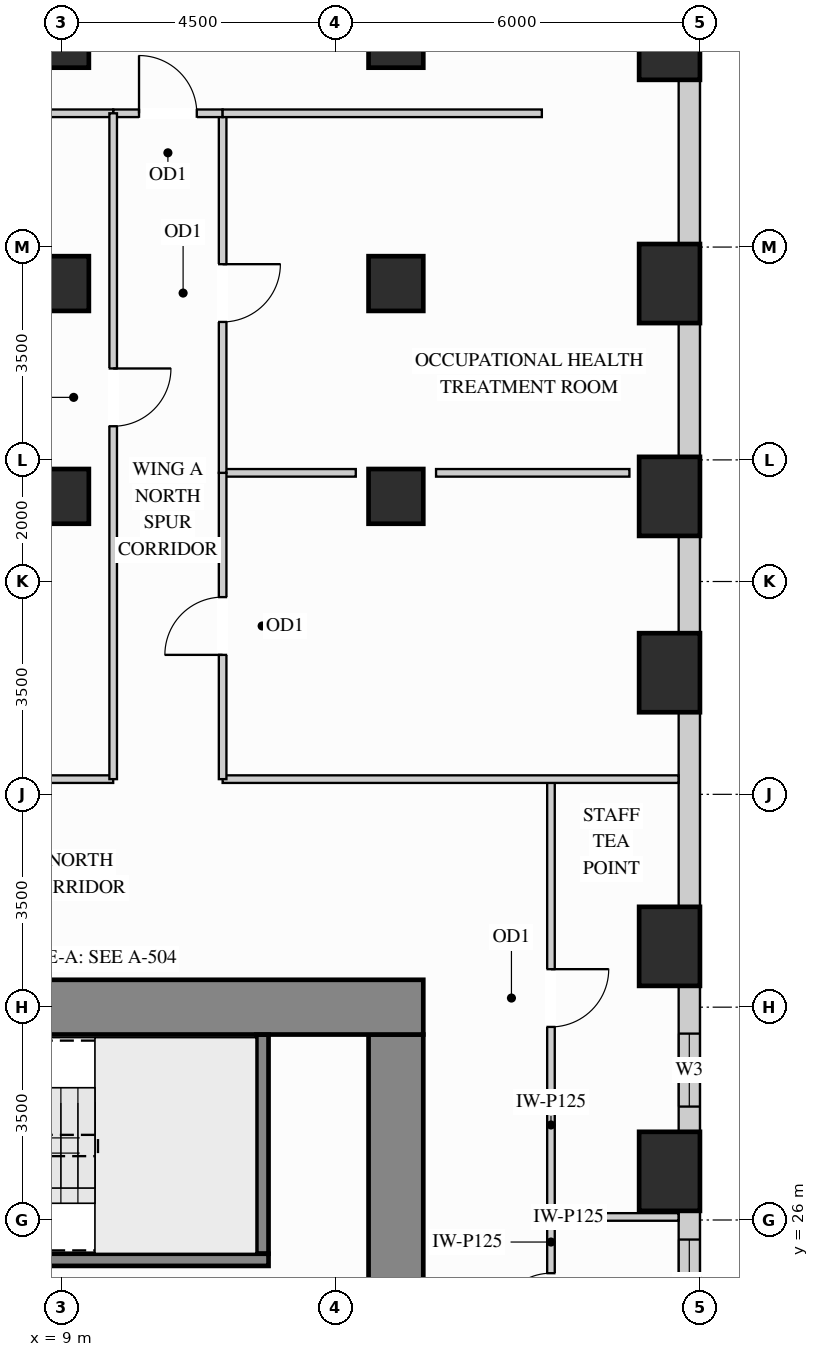
"""IFC4 building model, lengths in metres.
Left out: names, types, materials, properties, quantities, classifications, styles, units other than length and angle.
Written with IfcOpenShell. Run it as: python <this file> out.ifc"""

import sys

from ifc_helpers import new_model, si_unit, direction, frame, frame_2d, origin, origin_2d, place, context, subcontext, project, spatial, rectangle, extrude, source, transform, mapped, element, fill, save


model = new_model("IFC4")
c1 = context("Model", 3, precision=1e-05, world=origin(), true_north=direction((0.0, 1.0)))
c2 = subcontext(c1, "Body", "Model", "MODEL_VIEW")
j1 = project(units=[si_unit("LENGTHUNIT", "METRE"), si_unit("PLANEANGLEUNIT", "RADIAN")], contexts=[c1])
p1 = place(None, origin())
s1 = spatial("IfcSite", under=j1, at=p1, CompositionType="ELEMENT")
p2 = place(p1, origin())
s2 = spatial("IfcBuilding", under=s1, at=p2, CompositionType="ELEMENT")
p3 = place(p2, frame((0.0, 0.0, 33.3)))
s3 = spatial("IfcBuildingStorey", under=s2, at=p3, CompositionType="ELEMENT", Elevation=33.3)
m1 = source(origin(), c2, "Body", "SweptSolid", [
    extrude(rectangle(XDim=0.9, YDim=0.9, at=origin_2d()), origin(), (0.0, 0.0, 1.0), 3.38),
])
for number, where, z_axis, x_axis in (
    (1, (14.5, 37.9, 0.0), (0.0, 0.0, 1.0), (1.0, 0.0, 0.0)),
    (2, (14.5, 41.4, 0.0), (0.0, 0.0, 1.0), (1.0, 0.0, 0.0)),
    (3, (14.5, 45.4, 0.0), (0.0, 0.0, 1.0), (1.0, 0.0, 0.0)),
    (4, (9.0, 37.9, 0.0), (0.0, 0.0, 1.0), (1.0, 0.0, 0.0)),
    (5, (9.0, 41.4, 0.0), (0.0, 0.0, 1.0), (1.0, 0.0, 0.0)),
    (6, (9.0, 45.4, 0.0), (0.0, 0.0, 1.0), (1.0, 0.0, 0.0)),
):
    element("IfcColumn", number, at=place(p3, frame(where, z_axis=z_axis, x_axis=x_axis)), inside=s3, PredefinedType="COLUMN", context=c2, shape_type="MappedRepresentation", body=[
        mapped(m1, transform((0.0, 0.0, 0.0), x_axis=(1.0, 0.0, 0.0), y_axis=(0.0, 1.0, 0.0), z_axis=(0.0, 0.0, 1.0))),
    ])
m2 = source(origin(), c2, "Body", "SweptSolid", [
    extrude(rectangle(XDim=1.0, YDim=1.3, at=origin_2d()), origin(), (0.0, 0.0, 1.0), 3.38),
])
for number, where, z_axis, x_axis in (
    (7, (19.0, 26.8, 0.0), (0.0, 0.0, 1.0), (1.0, 0.0, 0.0)),
    (8, (19.0, 30.5, 0.0), (0.0, 0.0, 1.0), (1.0, 0.0, 0.0)),
    (9, (19.0, 35.0, 0.0), (0.0, 0.0, 1.0), (1.0, 0.0, 0.0)),
    (10, (19.0, 37.9, 0.0), (0.0, 0.0, 1.0), (1.0, 0.0, 0.0)),
    (11, (19.0, 41.4, 0.0), (0.0, 0.0, 1.0), (1.0, 0.0, 0.0)),
    (12, (19.0, 45.4, 0.0), (0.0, 0.0, 1.0), (1.0, 0.0, 0.0)),
):
    element("IfcColumn", number, at=place(p3, frame(where, z_axis=z_axis, x_axis=x_axis)), inside=s3, PredefinedType="COLUMN", context=c2, shape_type="MappedRepresentation", body=[
        mapped(m2, transform((0.0, 0.0, 0.0), x_axis=(1.0, 0.0, 0.0), y_axis=(0.0, 1.0, 0.0), z_axis=(0.0, 0.0, 1.0))),
    ])
m3 = source(origin(), c2, "Body", "SweptSolid", [
    extrude(rectangle(XDim=8.17, YDim=0.9, at=frame_2d((4.085, 0.0))), origin(), (0.0, 0.0, 1.0), 3.38),
])
p4 = place(p3, frame((14.5, 20.88, 0.0), z_axis=(0.0, 0.0, 1.0), x_axis=(0.0, 1.0, 0.0)))
e13 = element("IfcWall", 13, at=p4, inside=s3, PredefinedType="SHEAR", context=c2, shape_type="MappedRepresentation", body=[
    mapped(m3, transform((0.0, 0.0, 0.0), x_axis=(1.0, 0.0, 0.0), y_axis=(0.0, 1.0, 0.0), z_axis=(0.0, 0.0, 1.0))),
])
m4 = source(origin(), c2, "Body", "SweptSolid", [
    extrude(rectangle(XDim=10.9, YDim=0.9, at=frame_2d((5.45, 0.0))), origin(), (0.0, 0.0, 1.0), 3.38),
])
p5 = place(p3, frame((4.05, 29.5, 0.0), z_axis=(0.0, 0.0, 1.0), x_axis=(1.0, 0.0, 0.0)))
e14 = element("IfcWall", 14, at=p5, inside=s3, PredefinedType="SHEAR", context=c2, shape_type="MappedRepresentation", body=[
    mapped(m4, transform((0.0, 0.0, 0.0), x_axis=(1.0, 0.0, 0.0), y_axis=(0.0, 1.0, 0.0), z_axis=(0.0, 0.0, 1.0))),
])
p6 = place(p3, frame((19.325, 23.148, 0.0), z_axis=(0.0, 0.0, 1.0), x_axis=(0.0, 1.0, 0.0)))
e15 = element("IfcWall", 15, at=p6, inside=s3, PredefinedType="SOLIDWALL", context=c2, shape_type="SweptSolid", body=[
    extrude(rectangle(XDim=3.004, YDim=0.35, at=frame_2d((1.502, 0.0))), origin(), (0.0, 0.0, 1.0), 2.51),
])
p7 = place(p6, frame((1.031, 0.0, 0.78)))
e16 = element("IfcOpeningElement", 16, at=p7, cuts=e15, PredefinedType="OPENING", context=c2, shape_type="SweptSolid", body=[
    extrude(rectangle(XDim=1.5, YDim=1.55, at=frame_2d((0.75, 0.775))), frame((0.0, 0.185, 0.0), z_axis=(0.0, -1.0, 0.0), x_axis=(1.0, 0.0, 0.0)), (0.0, 0.0, 1.0), 0.37),
])
p8 = place(p3, frame((19.325, 27.448, 0.0), z_axis=(0.0, 0.0, 1.0), x_axis=(0.0, 1.0, 0.0)))
e17 = element("IfcWall", 17, at=p8, inside=s3, PredefinedType="SOLIDWALL", context=c2, shape_type="SweptSolid", body=[
    extrude(rectangle(XDim=2.404, YDim=0.35, at=frame_2d((1.202, 0.0))), origin(), (0.0, 0.0, 1.0), 2.51),
])
p9 = place(p8, frame((0.417, 0.0, 0.78)))
e18 = element("IfcOpeningElement", 18, at=p9, cuts=e17, PredefinedType="OPENING", context=c2, shape_type="SweptSolid", body=[
    extrude(rectangle(XDim=1.2, YDim=1.55, at=frame_2d((0.6, 0.775))), frame((0.0, 0.185, 0.0), z_axis=(0.0, -1.0, 0.0), x_axis=(1.0, 0.0, 0.0)), (0.0, 0.0, 1.0), 0.37),
])
m5 = source(origin(), c2, "Body", "SweptSolid", [
    extrude(rectangle(XDim=3.204, YDim=0.35, at=frame_2d((1.602, 0.0))), origin(), (0.0, 0.0, 1.0), 2.51),
])
p10 = place(p3, frame((19.325, 31.148, 0.0), z_axis=(0.0, 0.0, 1.0), x_axis=(0.0, 1.0, 0.0)))
e19 = element("IfcWall", 19, at=p10, inside=s3, PredefinedType="SOLIDWALL", context=c2, shape_type="MappedRepresentation", body=[
    mapped(m5, transform((0.0, 0.0, 0.0), x_axis=(1.0, 0.0, 0.0), y_axis=(0.0, 1.0, 0.0), z_axis=(0.0, 0.0, 1.0))),
])
m6 = source(origin(), c2, "Body", "SweptSolid", [
    extrude(rectangle(XDim=1.604, YDim=0.35, at=frame_2d((0.802, 0.0))), origin(), (0.0, 0.0, 1.0), 2.51),
])
p11 = place(p3, frame((19.325, 35.648, 0.0), z_axis=(0.0, 0.0, 1.0), x_axis=(0.0, 1.0, 0.0)))
e20 = element("IfcWall", 20, at=p11, inside=s3, PredefinedType="SOLIDWALL", context=c2, shape_type="MappedRepresentation", body=[
    mapped(m6, transform((0.0, 0.0, 0.0), x_axis=(1.0, 0.0, 0.0), y_axis=(0.0, 1.0, 0.0), z_axis=(0.0, 0.0, 1.0))),
])
m7 = source(origin(), c2, "Body", "SweptSolid", [
    extrude(rectangle(XDim=2.204, YDim=0.35, at=frame_2d((1.102, 0.0))), origin(), (0.0, 0.0, 1.0), 2.51),
])
p12 = place(p3, frame((19.325, 38.548, 0.0), z_axis=(0.0, 0.0, 1.0), x_axis=(0.0, 1.0, 0.0)))
e21 = element("IfcWall", 21, at=p12, inside=s3, PredefinedType="SOLIDWALL", context=c2, shape_type="MappedRepresentation", body=[
    mapped(m7, transform((0.0, 0.0, 0.0), x_axis=(1.0, 0.0, 0.0), y_axis=(0.0, 1.0, 0.0), z_axis=(0.0, 0.0, 1.0))),
])
m8 = source(origin(), c2, "Body", "SweptSolid", [
    extrude(rectangle(XDim=2.704, YDim=0.35, at=frame_2d((1.352, 0.0))), origin(), (0.0, 0.0, 1.0), 2.51),
])
p13 = place(p3, frame((19.325, 42.048, 0.0), z_axis=(0.0, 0.0, 1.0), x_axis=(0.0, 1.0, 0.0)))
e22 = element("IfcWall", 22, at=p13, inside=s3, PredefinedType="SOLIDWALL", context=c2, shape_type="MappedRepresentation", body=[
    mapped(m8, transform((0.0, 0.0, 0.0), x_axis=(1.0, 0.0, 0.0), y_axis=(0.0, 1.0, 0.0), z_axis=(0.0, 0.0, 1.0))),
])
m9 = source(origin(), c2, "Body", "SweptSolid", [
    extrude(rectangle(XDim=2.098, YDim=0.125, at=frame_2d((1.049, 0.0))), origin(), (0.0, 0.0, 1.0), 3.365),
])
p14 = place(p3, frame((17.05, 26.05, 0.0), z_axis=(0.0, 0.0, 1.0), x_axis=(1.0, 0.0, 0.0)))
e23 = element("IfcWall", 23, at=p14, inside=s3, PredefinedType="PARTITIONING", context=c2, shape_type="MappedRepresentation", body=[
    mapped(m9, transform((0.0, 0.0, 0.0), x_axis=(1.0, 0.0, 0.0), y_axis=(0.0, 1.0, 0.0), z_axis=(0.0, 0.0, 1.0))),
])
p15 = place(p3, frame((17.05, 26.05, 0.0), z_axis=(0.0, 0.0, 1.0), x_axis=(0.0, 1.0, 0.0)))
e24 = element("IfcWall", 24, at=p15, inside=s3, PredefinedType="PARTITIONING", context=c2, shape_type="SweptSolid", body=[
    extrude(rectangle(XDim=7.2, YDim=0.125, at=frame_2d((3.6, 0.0))), origin(), (0.0, 0.0, 1.0), 3.365),
])
p16 = place(p15, frame((3.125, 0.0, 0.0)))
e25 = element("IfcOpeningElement", 25, at=p16, cuts=e24, PredefinedType="OPENING", context=c2, shape_type="SweptSolid", body=[
    extrude(rectangle(XDim=0.95, YDim=2.15, at=frame_2d((0.475, 1.075))), frame((0.0, 0.073, 0.0), z_axis=(0.0, -1.0, 0.0), x_axis=(1.0, 0.0, 0.0)), (0.0, 0.0, 1.0), 0.145),
])
p17 = place(p3, frame((17.05, 23.35, 0.0), z_axis=(0.0, 0.0, 1.0), x_axis=(0.0, 1.0, 0.0)))
e26 = element("IfcWall", 26, at=p17, inside=s3, PredefinedType="PARTITIONING", context=c2, shape_type="SweptSolid", body=[
    extrude(rectangle(XDim=2.7, YDim=0.125, at=frame_2d((1.35, 0.0))), origin(), (0.0, 0.0, 1.0), 3.365),
])
p18 = place(p17, frame((0.875, 0.0, 0.0)))
e27 = element("IfcOpeningElement", 27, at=p18, cuts=e26, PredefinedType="OPENING", context=c2, shape_type="SweptSolid", body=[
    extrude(rectangle(XDim=0.9, YDim=2.15, at=frame_2d((0.45, 1.075))), frame((0.0, 0.073, 0.0), z_axis=(0.0, -1.0, 0.0), x_axis=(1.0, 0.0, 0.0)), (0.0, 0.0, 1.0), 0.145),
])
m10 = source(origin(), c2, "Body", "SweptSolid", [
    extrude(rectangle(XDim=2.19, YDim=0.125, at=frame_2d((1.095, 0.0))), origin(), (0.0, 0.0, 1.0), 3.365),
])
p19 = place(p3, frame((11.65, 38.287, 0.0), z_axis=(0.0, 0.0, 1.0), x_axis=(1.0, 0.0, 0.0)))
e28 = element("IfcWall", 28, at=p19, inside=s3, PredefinedType="PARTITIONING", context=c2, shape_type="MappedRepresentation", body=[
    mapped(m10, transform((0.0, 0.0, 0.0), x_axis=(1.0, 0.0, 0.0), y_axis=(0.0, 1.0, 0.0), z_axis=(0.0, 0.0, 1.0))),
])
m11 = source(origin(), c2, "Body", "SweptSolid", [
    extrude(rectangle(XDim=3.18, YDim=0.125, at=frame_2d((1.59, 0.0))), origin(), (0.0, 0.0, 1.0), 3.365),
])
p20 = place(p3, frame((15.16, 38.287, 0.0), z_axis=(0.0, 0.0, 1.0), x_axis=(1.0, 0.0, 0.0)))
e29 = element("IfcWall", 29, at=p20, inside=s3, PredefinedType="PARTITIONING", context=c2, shape_type="MappedRepresentation", body=[
    mapped(m11, transform((0.0, 0.0, 0.0), x_axis=(1.0, 0.0, 0.0), y_axis=(0.0, 1.0, 0.0), z_axis=(0.0, 0.0, 1.0))),
])
m12 = source(origin(), c2, "Body", "SweptSolid", [
    extrude(rectangle(XDim=7.498, YDim=0.125, at=frame_2d((3.749, 0.0))), origin(), (0.0, 0.0, 1.0), 2.828),
])
p21 = place(p3, frame((11.65, 33.25, 0.0), z_axis=(0.0, 0.0, 1.0), x_axis=(1.0, 0.0, 0.0)))
e30 = element("IfcWall", 30, at=p21, inside=s3, PredefinedType="PARTITIONING", context=c2, shape_type="MappedRepresentation", body=[
    mapped(m12, transform((0.0, 0.0, 0.0), x_axis=(1.0, 0.0, 0.0), y_axis=(0.0, 1.0, 0.0), z_axis=(0.0, 0.0, 1.0))),
])
m13 = source(origin(), c2, "Body", "SweptSolid", [
    extrude(rectangle(XDim=9.498, YDim=0.125, at=frame_2d((4.749, 0.0))), origin(), (0.0, 0.0, 1.0), 2.828),
])
p22 = place(p3, frame((0.352, 33.25, 0.0), z_axis=(0.0, 0.0, 1.0), x_axis=(1.0, 0.0, 0.0)))
e31 = element("IfcWall", 31, at=p22, inside=s3, PredefinedType="PARTITIONING", context=c2, shape_type="MappedRepresentation", body=[
    mapped(m13, transform((0.0, 0.0, 0.0), x_axis=(1.0, 0.0, 0.0), y_axis=(0.0, 1.0, 0.0), z_axis=(0.0, 0.0, 1.0))),
])
p23 = place(p3, frame((11.65, 33.25, 0.0), z_axis=(0.0, 0.0, 1.0), x_axis=(0.0, 1.0, 0.0)))
e32 = element("IfcWall", 32, at=p23, inside=s3, PredefinedType="PARTITIONING", context=c2, shape_type="SweptSolid", body=[
    extrude(rectangle(XDim=5.037, YDim=0.125, at=frame_2d((2.519, 0.0))), origin(), (0.0, 0.0, 1.0), 3.365),
])
p24 = place(p23, frame((2.043, 0.0, 0.0)))
e33 = element("IfcOpeningElement", 33, at=p24, cuts=e32, PredefinedType="OPENING", context=c2, shape_type="SweptSolid", body=[
    extrude(rectangle(XDim=0.95, YDim=2.15, at=frame_2d((0.475, 1.075))), frame((0.0, 0.073, 0.0), z_axis=(0.0, -1.0, 0.0), x_axis=(1.0, 0.0, 0.0)), (0.0, 0.0, 1.0), 0.145),
])
p25 = place(p3, frame((11.65, 38.287, 0.0), z_axis=(0.0, 0.0, 1.0), x_axis=(0.0, 1.0, 0.0)))
e34 = element("IfcWall", 34, at=p25, inside=s3, PredefinedType="PARTITIONING", context=c2, shape_type="SweptSolid", body=[
    extrude(rectangle(XDim=5.913, YDim=0.125, at=frame_2d((2.957, 0.0))), origin(), (0.0, 0.0, 1.0), 3.365),
])
p26 = place(p25, frame((2.481, 0.0, 0.0)))
e35 = element("IfcOpeningElement", 35, at=p26, cuts=e34, PredefinedType="OPENING", context=c2, shape_type="SweptSolid", body=[
    extrude(rectangle(XDim=0.95, YDim=2.15, at=frame_2d((0.475, 1.075))), frame((0.0, 0.073, 0.0), z_axis=(0.0, -1.0, 0.0), x_axis=(1.0, 0.0, 0.0)), (0.0, 0.0, 1.0), 0.145),
])
p27 = place(p3, frame((9.85, 44.2, 0.0), z_axis=(0.0, 0.0, 1.0), x_axis=(1.0, 0.0, 0.0)))
e36 = element("IfcWall", 36, at=p27, inside=s3, PredefinedType="PARTITIONING", context=c2, shape_type="SweptSolid", body=[
    extrude(rectangle(XDim=1.8, YDim=0.125, at=frame_2d((0.9, 0.0))), origin(), (0.0, 0.0, 1.0), 3.365),
])
p28 = place(p27, frame((0.425, 0.0, 0.0)))
e37 = element("IfcOpeningElement", 37, at=p28, cuts=e36, PredefinedType="OPENING", context=c2, shape_type="SweptSolid", body=[
    extrude(rectangle(XDim=0.95, YDim=2.15, at=frame_2d((0.475, 1.075))), frame((0.0, 0.073, 0.0), z_axis=(0.0, -1.0, 0.0), x_axis=(1.0, 0.0, 0.0)), (0.0, 0.0, 1.0), 0.145),
])
m14 = source(origin(), c2, "Body", "SweptSolid", [
    extrude(rectangle(XDim=5.25, YDim=0.125, at=frame_2d((2.625, 0.0))), origin(), (0.0, 0.0, 1.0), 3.365),
])
p29 = place(p3, frame((11.65, 44.2, 0.0), z_axis=(0.0, 0.0, 1.0), x_axis=(1.0, 0.0, 0.0)))
e38 = element("IfcWall", 38, at=p29, inside=s3, PredefinedType="PARTITIONING", context=c2, shape_type="MappedRepresentation", body=[
    mapped(m14, transform((0.0, 0.0, 0.0), x_axis=(1.0, 0.0, 0.0), y_axis=(0.0, 1.0, 0.0), z_axis=(0.0, 0.0, 1.0))),
])
m15 = source(origin(), c2, "Body", "SweptSolid", [
    extrude(rectangle(XDim=7.25, YDim=0.125, at=frame_2d((3.625, 0.0))), origin(), (0.0, 0.0, 1.0), 3.365),
])
p30 = place(p3, frame((2.6, 44.2, 0.0), z_axis=(0.0, 0.0, 1.0), x_axis=(1.0, 0.0, 0.0)))
e39 = element("IfcWall", 39, at=p30, inside=s3, PredefinedType="PARTITIONING", context=c2, shape_type="MappedRepresentation", body=[
    mapped(m15, transform((0.0, 0.0, 0.0), x_axis=(1.0, 0.0, 0.0), y_axis=(0.0, 1.0, 0.0), z_axis=(0.0, 0.0, 1.0))),
])
p31 = place(p3, frame((9.85, 33.25, 0.0), z_axis=(0.0, 0.0, 1.0), x_axis=(0.0, 1.0, 0.0)))
e40 = element("IfcWall", 40, at=p31, inside=s3, PredefinedType="PARTITIONING", context=c2, shape_type="SweptSolid", body=[
    extrude(rectangle(XDim=10.95, YDim=0.125, at=frame_2d((5.475, 0.0))), origin(), (0.0, 0.0, 1.0), 3.365),
])
p32 = place(p31, frame((5.803, 0.0, 0.0)))
e41 = element("IfcOpeningElement", 41, at=p32, cuts=e40, PredefinedType="OPENING", context=c2, shape_type="SweptSolid", body=[
    extrude(rectangle(XDim=0.95, YDim=2.15, at=frame_2d((0.475, 1.075))), frame((0.0, 0.073, 0.0), z_axis=(0.0, -1.0, 0.0), x_axis=(1.0, 0.0, 0.0)), (0.0, 0.0, 1.0), 0.145),
])
m16 = source(origin(), c2, "Body", "SweptSolid", [
    extrude(rectangle(XDim=3.603, YDim=0.2, at=frame_2d((1.802, 0.0))), origin(), (0.0, 0.0, 1.0), 3.38),
])
p33 = place(p3, frame((12.305, 25.445, 0.0), z_axis=(0.0, 0.0, 1.0), x_axis=(0.0, 1.0, 0.0)))
e42 = element("IfcWall", 42, at=p33, inside=s3, PredefinedType="SHEAR", context=c2, shape_type="MappedRepresentation", body=[
    mapped(m16, transform((0.0, 0.0, 0.0), x_axis=(1.0, 0.0, 0.0), y_axis=(0.0, 1.0, 0.0), z_axis=(0.0, 0.0, 1.0))),
])
p34 = place(p3, frame((4.952, 25.345, 0.0), z_axis=(0.0, 0.0, 1.0), x_axis=(1.0, 0.0, 0.0)))
e43 = element("IfcWall", 43, at=p34, inside=s3, PredefinedType="SHEAR", context=c2, shape_type="SweptSolid", body=[
    extrude(rectangle(XDim=7.453, YDim=0.2, at=frame_2d((3.727, 0.0))), origin(), (0.0, 0.0, 1.0), 3.38),
])
p35 = place(p34, frame((0.4, 0.0, 0.0)))
e44 = element("IfcOpeningElement", 44, at=p35, cuts=e43, PredefinedType="OPENING", context=c2, shape_type="SweptSolid", body=[
    extrude(rectangle(XDim=1.1, YDim=2.15, at=frame_2d((0.55, 1.075))), frame((0.0, 0.11, 0.0), z_axis=(0.0, -1.0, 0.0), x_axis=(1.0, 0.0, 0.0)), (0.0, 0.0, 1.0), 0.22),
])
m17 = source(origin(), c2, "Body", "SweptSolid", [
    extrude(rectangle(XDim=0.95, YDim=2.15, at=frame_2d((0.475, 1.075))), frame((0.0, 0.025, 0.0), z_axis=(0.0, -1.0, 0.0), x_axis=(1.0, 0.0, 0.0)), (0.0, 0.0, 1.0), 0.05),
])
p36 = place(p16, origin())
e45 = element("IfcDoor", 45, at=p36, inside=s3, OperationType="SINGLE_SWING_RIGHT", PredefinedType="DOOR", context=c2, shape_type="MappedRepresentation", body=[
    mapped(m17, transform((0.0, 0.0, 0.0), x_axis=(1.0, 0.0, 0.0), y_axis=(0.0, 1.0, 0.0), z_axis=(0.0, 0.0, 1.0))),
])
fill(e25, e45)
p37 = place(p24, origin())
e46 = element("IfcDoor", 46, at=p37, inside=s3, OperationType="SINGLE_SWING_LEFT", PredefinedType="DOOR", context=c2, shape_type="MappedRepresentation", body=[
    mapped(m17, transform((0.0, 0.0, 0.0), x_axis=(1.0, 0.0, 0.0), y_axis=(0.0, 1.0, 0.0), z_axis=(0.0, 0.0, 1.0))),
])
fill(e33, e46)
p38 = place(p26, origin())
e47 = element("IfcDoor", 47, at=p38, inside=s3, OperationType="SINGLE_SWING_RIGHT", PredefinedType="DOOR", context=c2, shape_type="MappedRepresentation", body=[
    mapped(m17, transform((0.0, 0.0, 0.0), x_axis=(1.0, 0.0, 0.0), y_axis=(0.0, 1.0, 0.0), z_axis=(0.0, 0.0, 1.0))),
])
fill(e35, e47)
p39 = place(p28, origin())
e48 = element("IfcDoor", 48, at=p39, inside=s3, OperationType="SINGLE_SWING_LEFT", PredefinedType="DOOR", context=c2, shape_type="MappedRepresentation", body=[
    mapped(m17, transform((0.0, 0.0, 0.0), x_axis=(1.0, 0.0, 0.0), y_axis=(0.0, 1.0, 0.0), z_axis=(0.0, 0.0, 1.0))),
])
fill(e37, e48)
p40 = place(p32, origin())
e49 = element("IfcDoor", 49, at=p40, inside=s3, OperationType="SINGLE_SWING_RIGHT", PredefinedType="DOOR", context=c2, shape_type="MappedRepresentation", body=[
    mapped(m17, transform((0.0, 0.0, 0.0), x_axis=(1.0, 0.0, 0.0), y_axis=(0.0, 1.0, 0.0), z_axis=(0.0, 0.0, 1.0))),
])
fill(e41, e49)
m18 = source(origin(), c2, "Body", "SweptSolid", [
    extrude(rectangle(XDim=0.9, YDim=2.15, at=frame_2d((0.45, 1.075))), frame((0.0, 0.025, 0.0), z_axis=(0.0, -1.0, 0.0), x_axis=(1.0, 0.0, 0.0)), (0.0, 0.0, 1.0), 0.05),
])
p41 = place(p18, origin())
e50 = element("IfcDoor", 50, at=p41, inside=s3, OperationType="SINGLE_SWING_LEFT", PredefinedType="DOOR", context=c2, shape_type="MappedRepresentation", body=[
    mapped(m18, transform((0.0, 0.0, 0.0), x_axis=(1.0, 0.0, 0.0), y_axis=(0.0, 1.0, 0.0), z_axis=(0.0, 0.0, 1.0))),
])
fill(e27, e50)
m19 = source(origin(), c2, "Body", "SweptSolid", [
    extrude(rectangle(XDim=1.2, YDim=1.55, at=frame_2d((0.6, 0.775))), frame((0.0, 0.03, 0.0), z_axis=(0.0, -1.0, 0.0), x_axis=(1.0, 0.0, 0.0)), (0.0, 0.0, 1.0), 0.06),
])
p42 = place(p9, origin())
e51 = element("IfcWindow", 51, at=p42, inside=s3, PartitioningType="SINGLE_PANEL", PredefinedType="WINDOW", context=c2, shape_type="MappedRepresentation", body=[
    mapped(m19, transform((0.0, 0.0, 0.0), x_axis=(1.0, 0.0, 0.0), y_axis=(0.0, 1.0, 0.0), z_axis=(0.0, 0.0, 1.0))),
])
fill(e18, e51)
m20 = source(origin(), c2, "Body", "SweptSolid", [
    extrude(rectangle(XDim=1.5, YDim=1.55, at=frame_2d((0.75, 0.775))), frame((0.0, 0.03, 0.0), z_axis=(0.0, -1.0, 0.0), x_axis=(1.0, 0.0, 0.0)), (0.0, 0.0, 1.0), 0.06),
])
p43 = place(p7, origin())
e52 = element("IfcWindow", 52, at=p43, inside=s3, PartitioningType="SINGLE_PANEL", PredefinedType="WINDOW", context=c2, shape_type="MappedRepresentation", body=[
    mapped(m20, transform((0.0, 0.0, 0.0), x_axis=(1.0, 0.0, 0.0), y_axis=(0.0, 1.0, 0.0), z_axis=(0.0, 0.0, 1.0))),
])
fill(e16, e52)
save(model, sys.argv[1])
